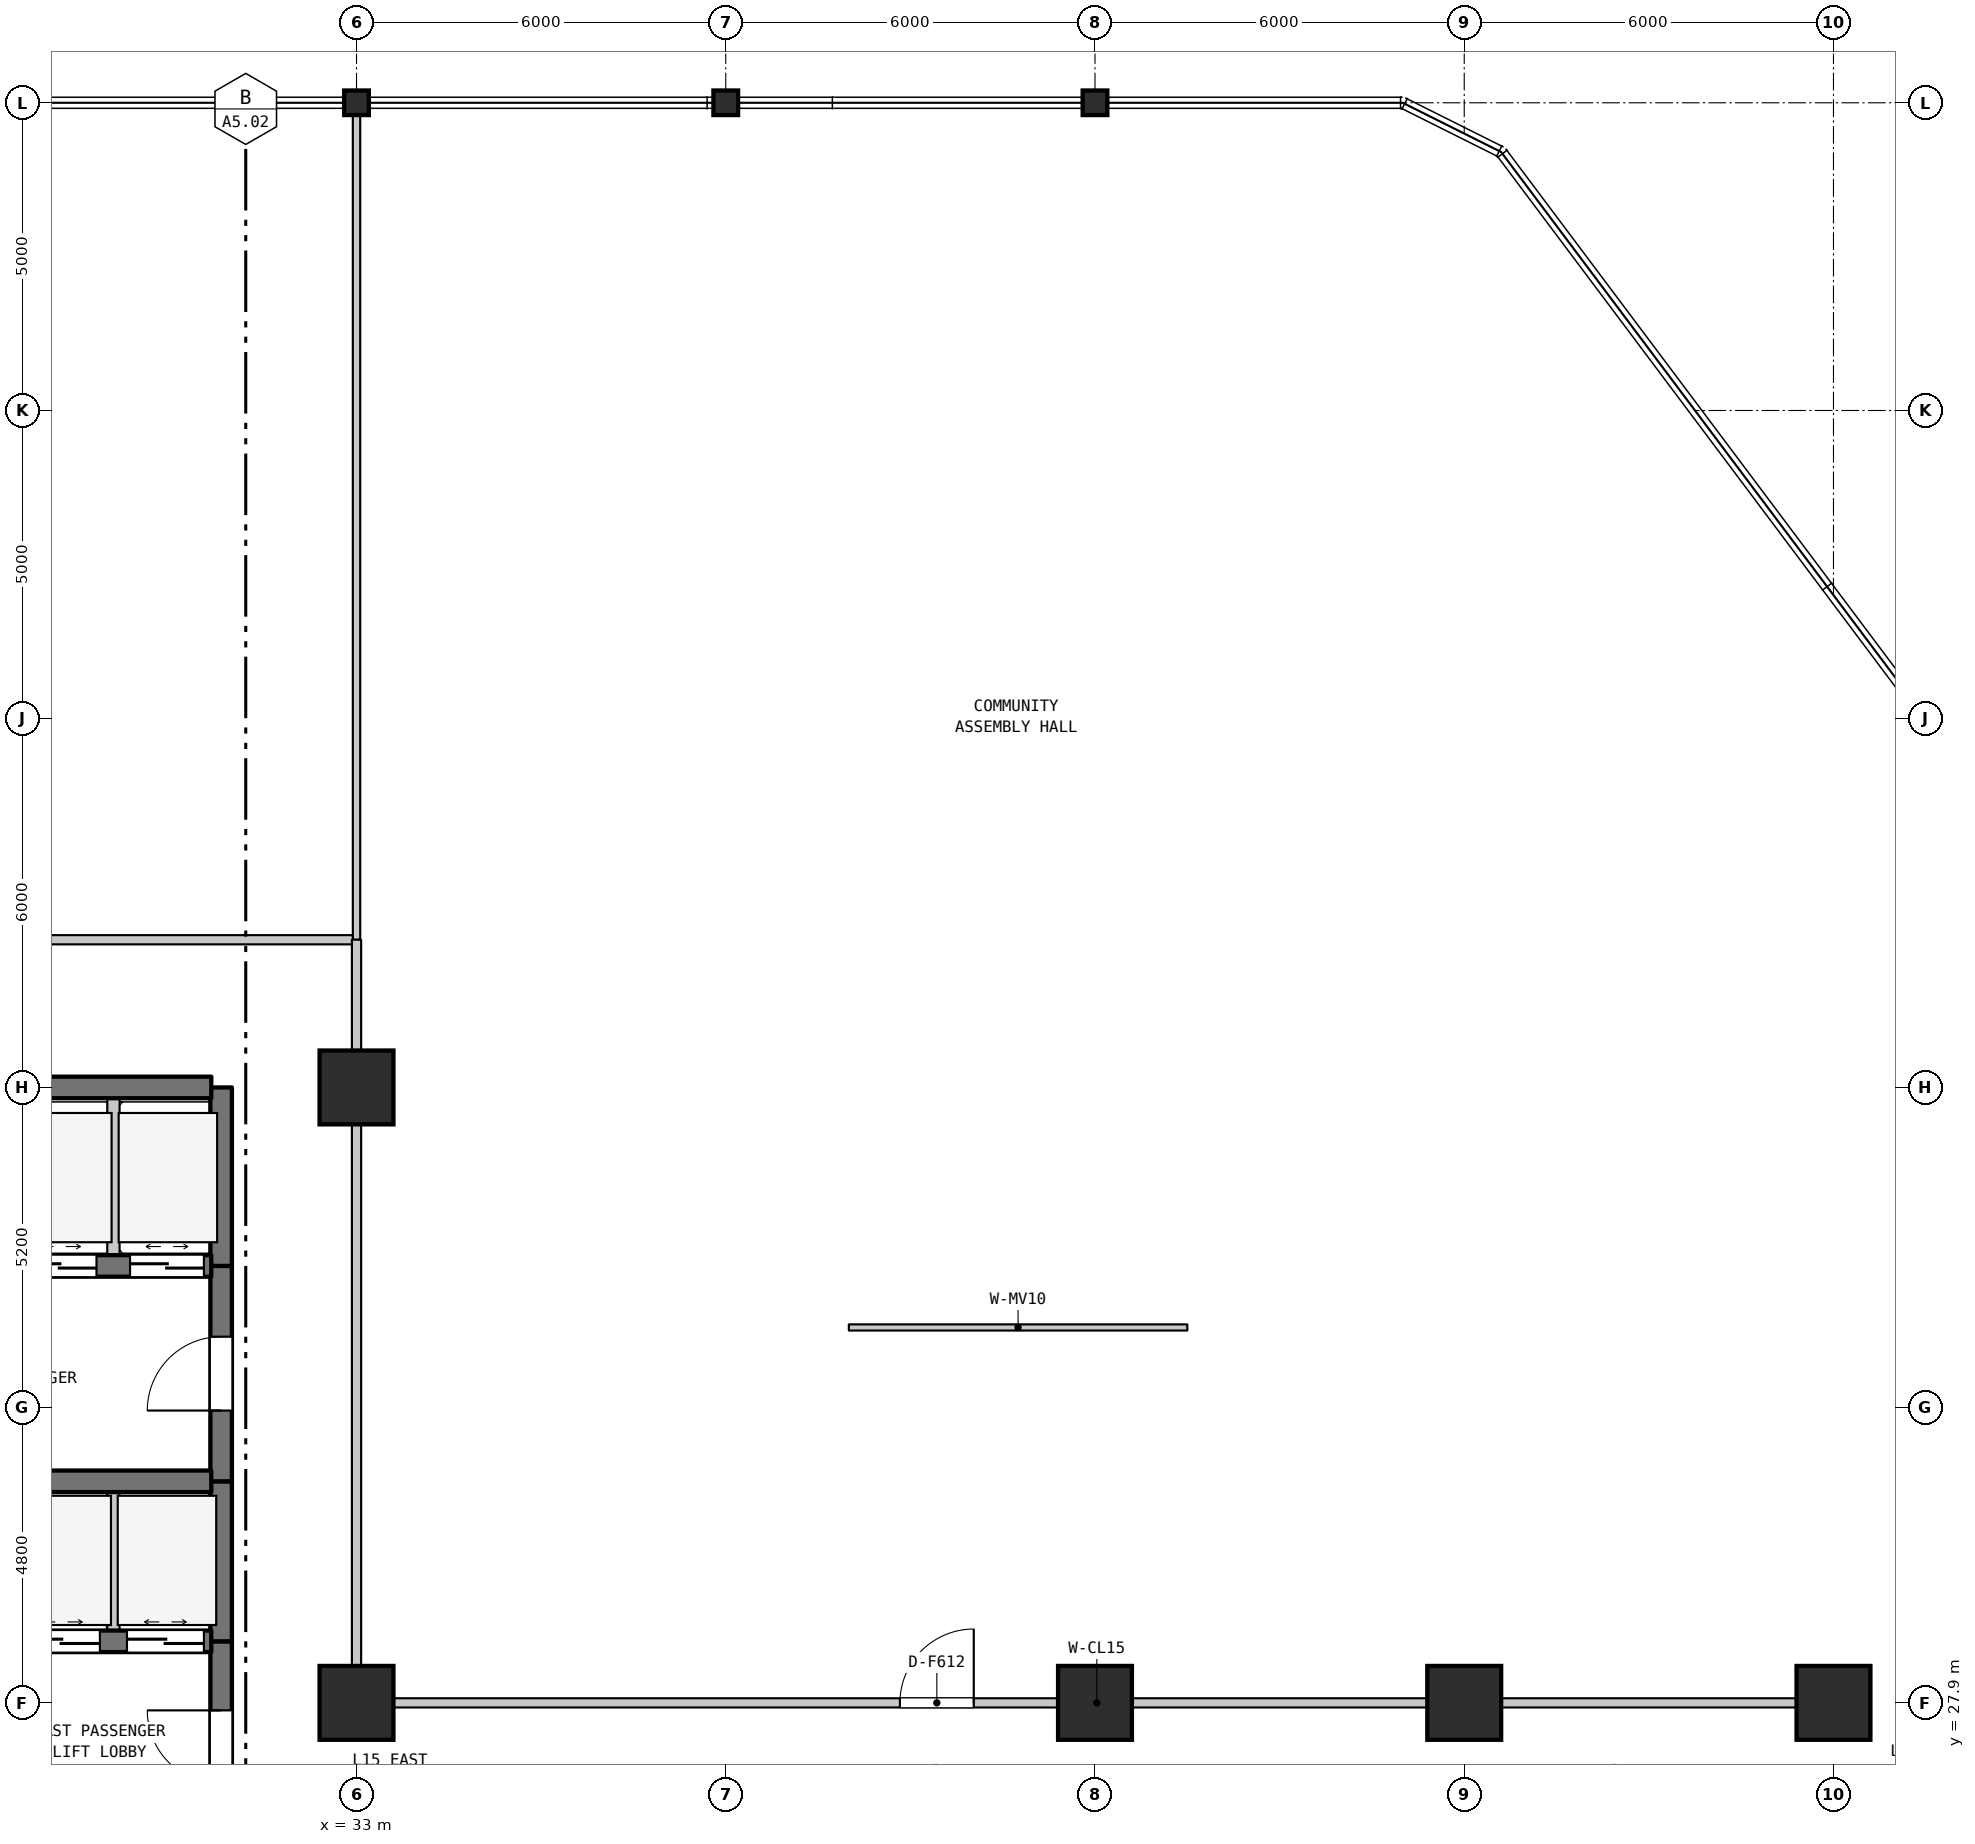
"""IFC4 building model, lengths in metres.
Left out: names, types, materials, properties, quantities, classifications, styles, units other than length and angle.
Written with IfcOpenShell. Run it as: python <this file> out.ifc"""

import sys

from ifc_helpers import new_model, si_unit, direction, frame, frame_2d, origin, origin_2d, place, context, subcontext, project, spatial, rectangle, i_section, extrude, element, fill, save


model = new_model("IFC4")
c1 = context("Model", 3, precision=1e-05, world=origin(), true_north=direction((0.0, 1.0)))
c2 = subcontext(c1, "Body", "Model", "MODEL_VIEW")
j1 = project(units=[si_unit("LENGTHUNIT", "METRE"), si_unit("PLANEANGLEUNIT", "RADIAN")], contexts=[c1])
p1 = place(None, origin())
s1 = spatial("IfcSite", under=j1, at=p1, CompositionType="ELEMENT")
p2 = place(p1, origin())
s2 = spatial("IfcBuilding", under=s1, at=p2, CompositionType="ELEMENT")
p3 = place(p2, frame((0.0, 0.0, 65.6)))
s3 = spatial("IfcBuildingStorey", under=s2, at=p3, CompositionType="ELEMENT", Elevation=65.6)
for number, where, z_axis, x_axis in (
    (1, (33.0, 27.9, 0.0), (0.0, 0.0, 1.0), (1.0, 0.0, 0.0)),
    (2, (33.0, 37.9, 0.0), (0.0, 0.0, 1.0), (1.0, 0.0, 0.0)),
):
    element("IfcColumn", number, at=place(p3, frame(where, z_axis=z_axis, x_axis=x_axis)), inside=s3, PredefinedType="COLUMN", context=c2, shape_type="SweptSolid", body=[
        extrude(rectangle(XDim=1.2, YDim=1.2, at=origin_2d()), origin(), (0.0, 0.0, 1.0), 4.5),
    ])
for number, where, z_axis, x_axis in (
    (3, (33.0, 53.9, 0.0), (0.0, 0.0, 1.0), (1.0, 0.0, 0.0)),
    (4, (39.0, 53.9, 0.0), (0.0, 0.0, 1.0), (1.0, 0.0, 0.0)),
):
    element("IfcColumn", number, at=place(p3, frame(where, z_axis=z_axis, x_axis=x_axis)), inside=s3, PredefinedType="COLUMN", context=c2, shape_type="SweptSolid", body=[
        extrude(i_section(OverallWidth=0.401, OverallDepth=0.399, WebThickness=0.025, FlangeThickness=0.04, FilletRadius=0.015, at=origin_2d()), origin(), (0.0, 0.0, 1.0), 4.5),
    ])
p4 = place(p3, frame((45.0, 27.9, 0.0), z_axis=(0.0, 0.0, 1.0), x_axis=(1.0, 0.0, 0.0)))
e5 = element("IfcColumn", 5, at=p4, inside=s3, PredefinedType="COLUMN", context=c2, shape_type="SweptSolid", body=[
    extrude(rectangle(XDim=1.2, YDim=1.2, at=origin_2d()), origin(), (0.0, 0.0, 1.0), 4.5),
])
p5 = place(p3, frame((45.0, 53.9, 0.0), z_axis=(0.0, 0.0, 1.0), x_axis=(1.0, 0.0, 0.0)))
e6 = element("IfcColumn", 6, at=p5, inside=s3, PredefinedType="COLUMN", context=c2, shape_type="SweptSolid", body=[
    extrude(i_section(OverallWidth=0.401, OverallDepth=0.399, WebThickness=0.025, FlangeThickness=0.04, FilletRadius=0.015, at=origin_2d()), origin(), (0.0, 0.0, 1.0), 4.5),
])
for number, where, z_axis, x_axis in (
    (7, (51.0, 27.9, 0.0), (0.0, 0.0, 1.0), (1.0, 0.0, 0.0)),
    (8, (57.0, 27.9, 0.0), (0.0, 0.0, 1.0), (1.0, 0.0, 0.0)),
):
    element("IfcColumn", number, at=place(p3, frame(where, z_axis=z_axis, x_axis=x_axis)), inside=s3, PredefinedType="COLUMN", context=c2, shape_type="SweptSolid", body=[
        extrude(rectangle(XDim=1.2, YDim=1.2, at=origin_2d()), origin(), (0.0, 0.0, 1.0), 4.5),
    ])
p6 = place(p3, frame((29.05, 28.9, 0.0), z_axis=(0.0, 0.0, 1.0), x_axis=(0.0, 1.0, 0.0)))
e9 = element("IfcWall", 9, at=p6, inside=s3, PredefinedType="STANDARD", context=c2, shape_type="SweptSolid", body=[
    extrude(rectangle(XDim=2.6, YDim=0.2, at=frame_2d((1.3, 0.0))), origin(), (0.0, 0.0, 1.0), 4.185),
])
p7 = place(p3, frame((29.05, 35.0, 0.0), z_axis=(0.0, 0.0, 1.0), x_axis=(0.0, 1.0, 0.0)))
e10 = element("IfcWall", 10, at=p7, inside=s3, PredefinedType="STANDARD", context=c2, shape_type="SweptSolid", body=[
    extrude(rectangle(XDim=2.9, YDim=0.2, at=frame_2d((1.45, 0.0))), origin(), (0.0, 0.0, 1.0), 4.185),
])
p8 = place(p3, frame((30.8, 25.6, 0.0), z_axis=(0.0, 0.0, 1.0), x_axis=(0.0, 1.0, 0.0)))
e11 = element("IfcWall", 11, at=p8, inside=s3, PredefinedType="SHEAR", context=c2, shape_type="SweptSolid", body=[
    extrude(rectangle(XDim=3.3, YDim=0.35, at=frame_2d((1.65, 0.0))), origin(), (0.0, 0.0, 1.0), 4.185),
])
p9 = place(p8, frame((0.978, 0.0, 0.0)))
e12 = element("IfcOpeningElement", 12, at=p9, cuts=e11, PredefinedType="OPENING", context=c2, shape_type="SweptSolid", body=[
    extrude(rectangle(XDim=1.2, YDim=2.2, at=frame_2d((0.6, 1.1))), frame((0.0, 0.185, 0.0), z_axis=(0.0, -1.0, 0.0), x_axis=(1.0, 0.0, 0.0)), (0.0, 0.0, 1.0), 0.37),
])
p10 = place(p3, frame((30.8, 28.9, 0.0), z_axis=(0.0, 0.0, 1.0), x_axis=(0.0, 1.0, 0.0)))
e13 = element("IfcWall", 13, at=p10, inside=s3, PredefinedType="SHEAR", context=c2, shape_type="SweptSolid", body=[
    extrude(rectangle(XDim=2.6, YDim=0.35, at=frame_2d((1.3, 0.0))), origin(), (0.0, 0.0, 1.0), 4.185),
])
p11 = place(p3, frame((30.8, 31.5, 0.0), z_axis=(0.0, 0.0, 1.0), x_axis=(0.0, 1.0, 0.0)))
e14 = element("IfcWall", 14, at=p11, inside=s3, PredefinedType="SHEAR", context=c2, shape_type="SweptSolid", body=[
    extrude(rectangle(XDim=3.5, YDim=0.35, at=frame_2d((1.75, 0.0))), origin(), (0.0, 0.0, 1.0), 4.185),
])
p12 = place(p11, frame((1.15, 0.0, 0.0)))
e15 = element("IfcOpeningElement", 15, at=p12, cuts=e14, PredefinedType="OPENING", context=c2, shape_type="SweptSolid", body=[
    extrude(rectangle(XDim=1.2, YDim=2.2, at=frame_2d((0.6, 1.1))), frame((0.0, 0.185, 0.0), z_axis=(0.0, -1.0, 0.0), x_axis=(1.0, 0.0, 0.0)), (0.0, 0.0, 1.0), 0.37),
])
p13 = place(p3, frame((30.8, 35.0, 0.0), z_axis=(0.0, 0.0, 1.0), x_axis=(0.0, 1.0, 0.0)))
e16 = element("IfcWall", 16, at=p13, inside=s3, PredefinedType="SHEAR", context=c2, shape_type="SweptSolid", body=[
    extrude(rectangle(XDim=2.9, YDim=0.35, at=frame_2d((1.45, 0.0))), origin(), (0.0, 0.0, 1.0), 4.185),
])
p14 = place(p3, frame((33.0, 27.9, 0.0), z_axis=(0.0, 0.0, 1.0), x_axis=(0.0, 1.0, 0.0)))
e17 = element("IfcWall", 17, at=p14, inside=s3, PredefinedType="STANDARD", context=c2, shape_type="SweptSolid", body=[
    extrude(rectangle(XDim=10.0, YDim=0.15, at=frame_2d((5.0, 0.0))), origin(), (0.0, 0.0, 1.0), 3.685),
])
p15 = place(p3, frame((33.0, 40.3, 0.0), z_axis=(0.0, 0.0, 1.0), x_axis=(0.0, 1.0, 0.0)))
e18 = element("IfcWall", 18, at=p15, inside=s3, PredefinedType="PARTITIONING", context=c2, shape_type="SweptSolid", body=[
    extrude(rectangle(XDim=13.59, YDim=0.12, at=frame_2d((6.795, 0.0))), origin(), (0.0, 0.0, 1.0), 3.585),
])
p16 = place(p3, frame((33.06, 27.9, 0.0), z_axis=(0.0, 0.0, 1.0), x_axis=(1.0, 0.0, 0.0)))
e19 = element("IfcWall", 19, at=p16, inside=s3, PredefinedType="STANDARD", context=c2, shape_type="SweptSolid", body=[
    extrude(rectangle(XDim=23.94, YDim=0.15, at=frame_2d((11.97, 0.0))), origin(), (0.0, 0.0, 1.0), 3.685),
])
p17 = place(p16, frame((8.77, 0.0, 0.0)))
e20 = element("IfcOpeningElement", 20, at=p17, cuts=e19, PredefinedType="OPENING", context=c2, shape_type="SweptSolid", body=[
    extrude(rectangle(XDim=1.2, YDim=2.2, at=frame_2d((0.6, 1.1))), frame((0.0, 0.085, 0.0), z_axis=(0.0, -1.0, 0.0), x_axis=(1.0, 0.0, 0.0)), (0.0, 0.0, 1.0), 0.17),
])
p18 = place(p3, frame((27.46, 28.9, 0.0), z_axis=(0.0, 0.0, 1.0), x_axis=(1.0, 0.0, 0.0)))
e21 = element("IfcWall", 21, at=p18, inside=s3, PredefinedType="SHEAR", context=c2, shape_type="SweptSolid", body=[
    extrude(rectangle(XDim=3.18, YDim=0.35, at=frame_2d((1.59, 0.0))), origin(), (0.0, 0.0, 1.0), 4.185),
])
p19 = place(p18, frame((0.12, 0.0, 0.0)))
e22 = element("IfcOpeningElement", 22, at=p19, cuts=e21, PredefinedType="OPENING", context=c2, shape_type="SweptSolid", body=[
    extrude(rectangle(XDim=1.25, YDim=2.2, at=frame_2d((0.625, 1.1))), frame((0.0, 0.185, 0.0), z_axis=(0.0, -1.0, 0.0), x_axis=(1.0, 0.0, 0.0)), (0.0, 0.0, 1.0), 0.37),
])
p20 = place(p18, frame((1.81, 0.0, 0.0)))
e23 = element("IfcOpeningElement", 23, at=p20, cuts=e21, PredefinedType="OPENING", context=c2, shape_type="SweptSolid", body=[
    extrude(rectangle(XDim=1.25, YDim=2.2, at=frame_2d((0.625, 1.1))), frame((0.0, 0.185, 0.0), z_axis=(0.0, -1.0, 0.0), x_axis=(1.0, 0.0, 0.0)), (0.0, 0.0, 1.0), 0.37),
])
p21 = place(p3, frame((27.46, 31.5, 0.0), z_axis=(0.0, 0.0, 1.0), x_axis=(1.0, 0.0, 0.0)))
e24 = element("IfcWall", 24, at=p21, inside=s3, PredefinedType="SHEAR", context=c2, shape_type="SweptSolid", body=[
    extrude(rectangle(XDim=3.18, YDim=0.35, at=frame_2d((1.59, 0.0))), origin(), (0.0, 0.0, 1.0), 4.185),
])
p22 = place(p3, frame((19.16, 35.0, 0.0), z_axis=(0.0, 0.0, 1.0), x_axis=(1.0, 0.0, 0.0)))
e25 = element("IfcWall", 25, at=p22, inside=s3, PredefinedType="SHEAR", context=c2, shape_type="SweptSolid", body=[
    extrude(rectangle(XDim=11.48, YDim=0.35, at=frame_2d((5.74, 0.0))), origin(), (0.0, 0.0, 1.0), 4.185),
])
p23 = place(p22, frame((0.365, 0.0, 0.0)))
e26 = element("IfcOpeningElement", 26, at=p23, cuts=e25, PredefinedType="OPENING", context=c2, shape_type="SweptSolid", body=[
    extrude(rectangle(XDim=1.35, YDim=2.2, at=frame_2d((0.675, 1.1))), frame((0.0, 0.185, 0.0), z_axis=(0.0, -1.0, 0.0), x_axis=(1.0, 0.0, 0.0)), (0.0, 0.0, 1.0), 0.37),
])
p24 = place(p22, frame((2.765, 0.0, 0.0)))
e27 = element("IfcOpeningElement", 27, at=p24, cuts=e25, PredefinedType="OPENING", context=c2, shape_type="SweptSolid", body=[
    extrude(rectangle(XDim=1.35, YDim=2.2, at=frame_2d((0.675, 1.1))), frame((0.0, 0.185, 0.0), z_axis=(0.0, -1.0, 0.0), x_axis=(1.0, 0.0, 0.0)), (0.0, 0.0, 1.0), 0.37),
])
p25 = place(p22, frame((4.915, 0.0, 0.0)))
e28 = element("IfcOpeningElement", 28, at=p25, cuts=e25, PredefinedType="OPENING", context=c2, shape_type="SweptSolid", body=[
    extrude(rectangle(XDim=1.2, YDim=2.2, at=frame_2d((0.6, 1.1))), frame((0.0, 0.185, 0.0), z_axis=(0.0, -1.0, 0.0), x_axis=(1.0, 0.0, 0.0)), (0.0, 0.0, 1.0), 0.37),
])
p26 = place(p22, frame((6.665, 0.0, 0.0)))
e29 = element("IfcOpeningElement", 29, at=p26, cuts=e25, PredefinedType="OPENING", context=c2, shape_type="SweptSolid", body=[
    extrude(rectangle(XDim=1.2, YDim=2.2, at=frame_2d((0.6, 1.1))), frame((0.0, 0.185, 0.0), z_axis=(0.0, -1.0, 0.0), x_axis=(1.0, 0.0, 0.0)), (0.0, 0.0, 1.0), 0.37),
])
p27 = place(p22, frame((8.415, 0.0, 0.0)))
e30 = element("IfcOpeningElement", 30, at=p27, cuts=e25, PredefinedType="OPENING", context=c2, shape_type="SweptSolid", body=[
    extrude(rectangle(XDim=1.2, YDim=2.2, at=frame_2d((0.6, 1.1))), frame((0.0, 0.185, 0.0), z_axis=(0.0, -1.0, 0.0), x_axis=(1.0, 0.0, 0.0)), (0.0, 0.0, 1.0), 0.37),
])
p28 = place(p22, frame((10.16, 0.0, 0.0)))
e31 = element("IfcOpeningElement", 31, at=p28, cuts=e25, PredefinedType="OPENING", context=c2, shape_type="SweptSolid", body=[
    extrude(rectangle(XDim=1.2, YDim=2.2, at=frame_2d((0.6, 1.1))), frame((0.0, 0.185, 0.0), z_axis=(0.0, -1.0, 0.0), x_axis=(1.0, 0.0, 0.0)), (0.0, 0.0, 1.0), 0.37),
])
p29 = place(p3, frame((19.16, 37.9, 0.0), z_axis=(0.0, 0.0, 1.0), x_axis=(1.0, 0.0, 0.0)))
e32 = element("IfcWall", 32, at=p29, inside=s3, PredefinedType="SHEAR", context=c2, shape_type="SweptSolid", body=[
    extrude(rectangle(XDim=11.48, YDim=0.35, at=frame_2d((5.74, 0.0))), origin(), (0.0, 0.0, 1.0), 4.185),
])
p30 = place(p3, frame((15.045, 40.3, 0.0), z_axis=(0.0, 0.0, 1.0), x_axis=(1.0, 0.0, 0.0)))
e33 = element("IfcWall", 33, at=p30, inside=s3, PredefinedType="STANDARD", context=c2, shape_type="SweptSolid", body=[
    extrude(rectangle(XDim=17.895, YDim=0.15, at=frame_2d((8.948, 0.0))), origin(), (0.0, 0.0, 1.0), 4.185),
])
p31 = place(p30, frame((9.205, 0.0, 0.0)))
e34 = element("IfcOpeningElement", 34, at=p31, cuts=e33, PredefinedType="OPENING", context=c2, shape_type="SweptSolid", body=[
    extrude(rectangle(XDim=1.0, YDim=2.15, at=frame_2d((0.5, 1.075))), frame((0.0, 0.085, 0.0), z_axis=(0.0, -1.0, 0.0), x_axis=(1.0, 0.0, 0.0)), (0.0, 0.0, 1.0), 0.17),
])
p32 = place(p3, frame((41.0, 34.0, 0.0), z_axis=(0.0, 0.0, 1.0), x_axis=(1.0, 0.0, 0.0)))
e35 = element("IfcWall", 35, at=p32, inside=s3, PredefinedType="MOVABLE", context=c2, shape_type="SweptSolid", body=[
    extrude(rectangle(XDim=5.5, YDim=0.1, at=frame_2d((2.75, 0.0))), origin(), (0.0, 0.0, 1.0), 4.135),
])
p33 = place(p3, frame((33.0, 37.9, 0.0), z_axis=(0.0, 0.0, 1.0), x_axis=(0.0, 1.0, 0.0)))
e36 = element("IfcWall", 36, at=p33, inside=s3, PredefinedType="STANDARD", context=c2, shape_type="SweptSolid", body=[
    extrude(rectangle(XDim=2.4, YDim=0.15, at=frame_2d((1.2, 0.0))), origin(), (0.0, 0.0, 1.0), 3.585),
])
p34 = place(p9, origin())
e37 = element("IfcDoor", 37, at=p34, inside=s3, OperationType="SINGLE_SWING_RIGHT", PredefinedType="DOOR", context=c2, shape_type="SweptSolid", body=[
    extrude(rectangle(XDim=1.2, YDim=2.2, at=frame_2d((0.6, 1.1))), frame((0.0, 0.025, 0.0), z_axis=(0.0, -1.0, 0.0), x_axis=(1.0, 0.0, 0.0)), (0.0, 0.0, 1.0), 0.05),
])
fill(e12, e37)
p35 = place(p12, origin())
e38 = element("IfcDoor", 38, at=p35, inside=s3, OperationType="SINGLE_SWING_LEFT", PredefinedType="DOOR", context=c2, shape_type="SweptSolid", body=[
    extrude(rectangle(XDim=1.2, YDim=2.2, at=frame_2d((0.6, 1.1))), frame((0.0, 0.025, 0.0), z_axis=(0.0, -1.0, 0.0), x_axis=(1.0, 0.0, 0.0)), (0.0, 0.0, 1.0), 0.05),
])
fill(e15, e38)
p36 = place(p17, origin())
e39 = element("IfcDoor", 39, at=p36, inside=s3, OperationType="SINGLE_SWING_RIGHT", PredefinedType="DOOR", context=c2, shape_type="SweptSolid", body=[
    extrude(rectangle(XDim=1.2, YDim=2.2, at=frame_2d((0.6, 1.1))), frame((0.0, 0.025, 0.0), z_axis=(0.0, -1.0, 0.0), x_axis=(1.0, 0.0, 0.0)), (0.0, 0.0, 1.0), 0.05),
])
fill(e20, e39)
p37 = place(p19, origin())
e40 = element("IfcDoor", 40, at=p37, inside=s3, OperationType="DOUBLE_DOOR_SLIDING", PredefinedType="DOOR", context=c2, shape_type="SweptSolid", body=[
    extrude(rectangle(XDim=1.25, YDim=2.2, at=frame_2d((0.625, 1.1))), frame((0.0, 0.025, 0.0), z_axis=(0.0, -1.0, 0.0), x_axis=(1.0, 0.0, 0.0)), (0.0, 0.0, 1.0), 0.05),
])
fill(e22, e40)
p38 = place(p20, origin())
e41 = element("IfcDoor", 41, at=p38, inside=s3, OperationType="DOUBLE_DOOR_SLIDING", PredefinedType="DOOR", context=c2, shape_type="SweptSolid", body=[
    extrude(rectangle(XDim=1.25, YDim=2.2, at=frame_2d((0.625, 1.1))), frame((0.0, 0.025, 0.0), z_axis=(0.0, -1.0, 0.0), x_axis=(1.0, 0.0, 0.0)), (0.0, 0.0, 1.0), 0.05),
])
fill(e23, e41)
p39 = place(p27, origin())
e42 = element("IfcDoor", 42, at=p39, inside=s3, OperationType="DOUBLE_DOOR_SLIDING", PredefinedType="DOOR", context=c2, shape_type="SweptSolid", body=[
    extrude(rectangle(XDim=1.2, YDim=2.2, at=frame_2d((0.6, 1.1))), frame((0.0, 0.025, 0.0), z_axis=(0.0, -1.0, 0.0), x_axis=(1.0, 0.0, 0.0)), (0.0, 0.0, 1.0), 0.05),
])
fill(e30, e42)
p40 = place(p28, origin())
e43 = element("IfcDoor", 43, at=p40, inside=s3, OperationType="DOUBLE_DOOR_SLIDING", PredefinedType="DOOR", context=c2, shape_type="SweptSolid", body=[
    extrude(rectangle(XDim=1.2, YDim=2.2, at=frame_2d((0.6, 1.1))), frame((0.0, 0.025, 0.0), z_axis=(0.0, -1.0, 0.0), x_axis=(1.0, 0.0, 0.0)), (0.0, 0.0, 1.0), 0.05),
])
fill(e31, e43)
save(model, sys.argv[1])
